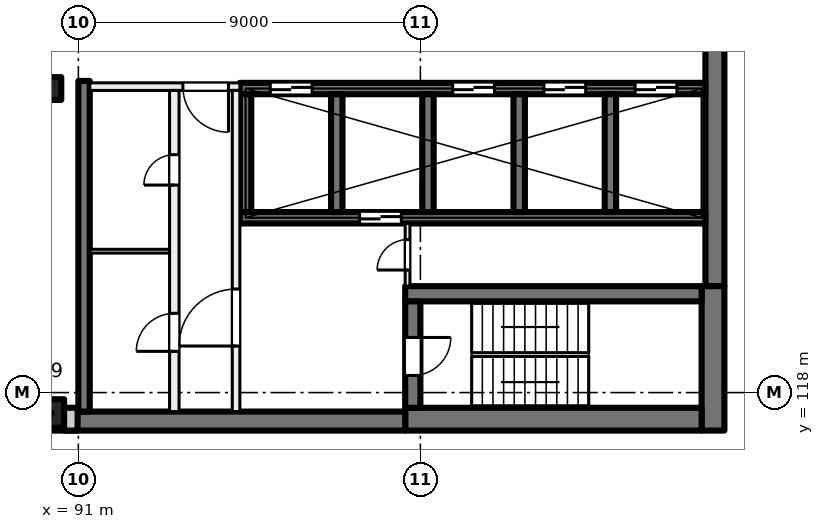
"""IFC4 building model, lengths in metres.
Left out: names, types, materials, properties, quantities, classifications, styles, units other than length and angle.
Written with IfcOpenShell. Run it as: python <this file> out.ifc"""

import sys

from ifc_helpers import new_model, si_unit, direction, frame, frame_2d, origin, origin_2d, place, context, subcontext, project, spatial, rectangle, extrude, element, fill, save


model = new_model("IFC4")
c1 = context("Model", 3, precision=1e-05, world=origin(), true_north=direction((0.0, 1.0)))
c2 = subcontext(c1, "Body", "Model", "MODEL_VIEW")
j1 = project(units=[si_unit("LENGTHUNIT", "METRE"), si_unit("PLANEANGLEUNIT", "RADIAN")], contexts=[c1])
p1 = place(None, origin())
s1 = spatial("IfcSite", under=j1, at=p1, CompositionType="ELEMENT")
p2 = place(p1, origin())
s2 = spatial("IfcBuilding", under=s1, at=p2, CompositionType="ELEMENT")
p3 = place(p2, frame((0.0, 0.0, 216.0)))
s3 = spatial("IfcBuildingStorey", under=s2, at=p3, CompositionType="ELEMENT", Elevation=216.0)
p4 = place(p3, frame((90.25, 126.0, 0.0), z_axis=(0.0, 0.0, 1.0), x_axis=(1.0, 0.0, 0.0)))
e1 = element("IfcColumn", 1, at=p4, inside=s3, PredefinedType="COLUMN", context=c2, shape_type="SweptSolid", body=[
    extrude(rectangle(XDim=0.6, YDim=0.6, at=origin_2d()), origin(), (0.0, 0.0, 1.0), 4.0),
])
p5 = place(p3, frame((90.25, 117.45, 0.0), z_axis=(0.0, 0.0, 1.0), x_axis=(1.0, 0.0, 0.0)))
e2 = element("IfcColumn", 2, at=p5, inside=s3, PredefinedType="COLUMN", context=c2, shape_type="SweptSolid", body=[
    extrude(rectangle(XDim=0.75, YDim=0.75, at=origin_2d()), origin(), (0.0, 0.0, 1.0), 4.0),
])
p6 = place(p3, frame((107.75, 135.2, 0.0), z_axis=(0.0, 0.0, 1.0), x_axis=(0.0, -1.0, 0.0)))
e3 = element("IfcWall", 3, at=p6, inside=s3, PredefinedType="SHEAR", context=c2, shape_type="SweptSolid", body=[
    extrude(rectangle(XDim=14.4, YDim=0.5, at=frame_2d((7.2, 0.0))), origin(), (0.0, 0.0, 1.0), 4.0),
])
p7 = place(p3, frame((107.7, 120.8, 0.0), z_axis=(0.0, 0.0, 1.0), x_axis=(0.0, -1.0, 0.0)))
e4 = element("IfcWall", 4, at=p7, inside=s3, PredefinedType="SHEAR", context=c2, shape_type="SweptSolid", body=[
    extrude(rectangle(XDim=3.8, YDim=0.6, at=frame_2d((1.9, 0.0))), origin(), (0.0, 0.0, 1.0), 4.0),
])
p8 = place(p3, frame((107.4, 117.3, 0.0), z_axis=(0.0, 0.0, 1.0), x_axis=(-1.0, 0.0, 0.0)))
e5 = element("IfcWall", 5, at=p8, inside=s3, PredefinedType="SHEAR", context=c2, shape_type="SweptSolid", body=[
    extrude(rectangle(XDim=7.8, YDim=0.6, at=frame_2d((3.9, 0.0))), origin(), (0.0, 0.0, 1.0), 4.0),
])
p9 = place(p3, frame((99.6, 117.25, 0.0), z_axis=(0.0, 0.0, 1.0), x_axis=(-1.0, 0.0, 0.0)))
e6 = element("IfcWall", 6, at=p9, inside=s3, PredefinedType="SHEAR", context=c2, shape_type="SweptSolid", body=[
    extrude(rectangle(XDim=8.975, YDim=0.5, at=frame_2d((4.488, 0.0))), origin(), (0.0, 0.0, 1.0), 4.0),
])
p10 = place(p3, frame((107.4, 120.6, 0.0), z_axis=(0.0, 0.0, 1.0), x_axis=(-1.0, 0.0, 0.0)))
e7 = element("IfcWall", 7, at=p10, inside=s3, PredefinedType="SHEAR", context=c2, shape_type="SweptSolid", body=[
    extrude(rectangle(XDim=7.8, YDim=0.4, at=frame_2d((3.9, 0.0))), origin(), (0.0, 0.0, 1.0), 4.0),
])
p11 = place(p3, frame((99.8, 120.4, 0.0), z_axis=(0.0, 0.0, 1.0), x_axis=(0.0, -1.0, 0.0)))
e8 = element("IfcWall", 8, at=p11, inside=s3, PredefinedType="SHEAR", context=c2, shape_type="SweptSolid", body=[
    extrude(rectangle(XDim=2.8, YDim=0.4, at=frame_2d((1.4, 0.0))), origin(), (0.0, 0.0, 1.0), 4.0),
])
p12 = place(p11, frame((0.95, 0.0, 0.0)))
e9 = element("IfcOpeningElement", 9, at=p12, cuts=e8, PredefinedType="OPENING", context=c2, shape_type="SweptSolid", body=[
    extrude(rectangle(XDim=1.0, YDim=2.1, at=frame_2d((0.5, 1.05))), frame((0.0, 0.21, 0.0), z_axis=(0.0, -1.0, 0.0), x_axis=(1.0, 0.0, 0.0)), (0.0, 0.0, 1.0), 0.42),
])
p13 = place(p3, frame((107.5, 126.0, 0.0), z_axis=(0.0, 0.0, 1.0), x_axis=(-1.0, 0.0, 0.0)))
e10 = element("IfcWall", 10, at=p13, inside=s3, PredefinedType="SHEAR", context=c2, shape_type="SweptSolid", body=[
    extrude(rectangle(XDim=12.25, YDim=0.3, at=frame_2d((6.125, 0.0))), origin(), (0.0, 0.0, 1.0), 4.0),
])
p14 = place(p13, frame((0.75, 0.0, 0.0)))
e11 = element("IfcOpeningElement", 11, at=p14, cuts=e10, PredefinedType="OPENING", context=c2, shape_type="SweptSolid", body=[
    extrude(rectangle(XDim=1.1, YDim=2.1, at=frame_2d((0.55, 1.05))), frame((0.0, 0.16, 0.0), z_axis=(0.0, -1.0, 0.0), x_axis=(1.0, 0.0, 0.0)), (0.0, 0.0, 1.0), 0.32),
])
p15 = place(p13, frame((3.15, 0.0, 0.0)))
e12 = element("IfcOpeningElement", 12, at=p15, cuts=e10, PredefinedType="OPENING", context=c2, shape_type="SweptSolid", body=[
    extrude(rectangle(XDim=1.1, YDim=2.1, at=frame_2d((0.55, 1.05))), frame((0.0, 0.16, 0.0), z_axis=(0.0, -1.0, 0.0), x_axis=(1.0, 0.0, 0.0)), (0.0, 0.0, 1.0), 0.32),
])
p16 = place(p13, frame((5.55, 0.0, 0.0)))
e13 = element("IfcOpeningElement", 13, at=p16, cuts=e10, PredefinedType="OPENING", context=c2, shape_type="SweptSolid", body=[
    extrude(rectangle(XDim=1.1, YDim=2.1, at=frame_2d((0.55, 1.05))), frame((0.0, 0.16, 0.0), z_axis=(0.0, -1.0, 0.0), x_axis=(1.0, 0.0, 0.0)), (0.0, 0.0, 1.0), 0.32),
])
p17 = place(p13, frame((10.35, 0.0, 0.0)))
e14 = element("IfcOpeningElement", 14, at=p17, cuts=e10, PredefinedType="OPENING", context=c2, shape_type="SweptSolid", body=[
    extrude(rectangle(XDim=1.1, YDim=2.1, at=frame_2d((0.55, 1.05))), frame((0.0, 0.16, 0.0), z_axis=(0.0, -1.0, 0.0), x_axis=(1.0, 0.0, 0.0)), (0.0, 0.0, 1.0), 0.32),
])
p18 = place(p3, frame((107.5, 122.6, 0.0), z_axis=(0.0, 0.0, 1.0), x_axis=(-1.0, 0.0, 0.0)))
e15 = element("IfcWall", 15, at=p18, inside=s3, PredefinedType="SHEAR", context=c2, shape_type="SweptSolid", body=[
    extrude(rectangle(XDim=12.25, YDim=0.3, at=frame_2d((6.125, 0.0))), origin(), (0.0, 0.0, 1.0), 4.0),
])
p19 = place(p18, frame((8.0, 0.0, 0.0)))
e16 = element("IfcOpeningElement", 16, at=p19, cuts=e15, PredefinedType="OPENING", context=c2, shape_type="SweptSolid", body=[
    extrude(rectangle(XDim=1.1, YDim=2.1, at=frame_2d((0.55, 1.05))), frame((0.0, 0.16, 0.0), z_axis=(0.0, -1.0, 0.0), x_axis=(1.0, 0.0, 0.0)), (0.0, 0.0, 1.0), 0.32),
])
for number, where, z_axis, x_axis in (
    (17, (105.0, 125.85, 0.0), (0.0, 0.0, 1.0), (0.0, -1.0, 0.0)),
    (18, (102.6, 125.85, 0.0), (0.0, 0.0, 1.0), (0.0, -1.0, 0.0)),
    (19, (100.2, 125.85, 0.0), (0.0, 0.0, 1.0), (0.0, -1.0, 0.0)),
    (20, (97.8, 125.85, 0.0), (0.0, 0.0, 1.0), (0.0, -1.0, 0.0)),
    (21, (95.4, 125.85, 0.0), (0.0, 0.0, 1.0), (0.0, -1.0, 0.0)),
):
    element("IfcWall", number, at=place(p3, frame(where, z_axis=z_axis, x_axis=x_axis)), inside=s3, PredefinedType="SHEAR", context=c2, shape_type="SweptSolid", body=[
        extrude(rectangle(XDim=3.1, YDim=0.3, at=frame_2d((1.55, 0.0))), origin(), (0.0, 0.0, 1.0), 4.0),
    ])
p20 = place(p3, frame((91.15, 126.2, 0.0), z_axis=(0.0, 0.0, 1.0), x_axis=(0.0, -1.0, 0.0)))
e22 = element("IfcWall", 22, at=p20, inside=s3, PredefinedType="SHEAR", context=c2, shape_type="SweptSolid", body=[
    extrude(rectangle(XDim=8.7, YDim=0.3, at=frame_2d((4.35, 0.0))), origin(), (0.0, 0.0, 1.0), 4.0),
])
p21 = place(p3, frame((90.98, 117.3, 0.0), z_axis=(0.0, 0.0, 1.0), x_axis=(-1.0, 0.0, 0.0)))
e23 = element("IfcWall", 23, at=p21, inside=s3, PredefinedType="SOLIDWALL", context=c2, shape_type="SweptSolid", body=[
    extrude(rectangle(XDim=32.845, YDim=0.6, at=frame_2d((16.422, 0.0))), origin(), (0.0, 0.0, 1.0), 3.625),
])
p22 = place(p21, frame((1.48, 0.0, 0.9)))
e24 = element("IfcOpeningElement", 24, at=p22, cuts=e23, PredefinedType="OPENING", context=c2, shape_type="SweptSolid", body=[
    extrude(rectangle(XDim=3.0, YDim=2.4, at=frame_2d((1.5, 1.2))), frame((0.0, 0.31, 0.0), z_axis=(0.0, -1.0, 0.0), x_axis=(1.0, 0.0, 0.0)), (0.0, 0.0, 1.0), 0.62),
])
p23 = place(p21, frame((5.98, 0.0, 0.9)))
e25 = element("IfcOpeningElement", 25, at=p23, cuts=e23, PredefinedType="OPENING", context=c2, shape_type="SweptSolid", body=[
    extrude(rectangle(XDim=3.0, YDim=2.4, at=frame_2d((1.5, 1.2))), frame((0.0, 0.31, 0.0), z_axis=(0.0, -1.0, 0.0), x_axis=(1.0, 0.0, 0.0)), (0.0, 0.0, 1.0), 0.62),
])
p24 = place(p21, frame((10.48, 0.0, 0.9)))
e26 = element("IfcOpeningElement", 26, at=p24, cuts=e23, PredefinedType="OPENING", context=c2, shape_type="SweptSolid", body=[
    extrude(rectangle(XDim=3.0, YDim=2.4, at=frame_2d((1.5, 1.2))), frame((0.0, 0.31, 0.0), z_axis=(0.0, -1.0, 0.0), x_axis=(1.0, 0.0, 0.0)), (0.0, 0.0, 1.0), 0.62),
])
p25 = place(p21, frame((14.98, 0.0, 0.9)))
e27 = element("IfcOpeningElement", 27, at=p25, cuts=e23, PredefinedType="OPENING", context=c2, shape_type="SweptSolid", body=[
    extrude(rectangle(XDim=3.0, YDim=2.4, at=frame_2d((1.5, 1.2))), frame((0.0, 0.31, 0.0), z_axis=(0.0, -1.0, 0.0), x_axis=(1.0, 0.0, 0.0)), (0.0, 0.0, 1.0), 0.62),
])
p26 = place(p21, frame((19.48, 0.0, 0.9)))
e28 = element("IfcOpeningElement", 28, at=p26, cuts=e23, PredefinedType="OPENING", context=c2, shape_type="SweptSolid", body=[
    extrude(rectangle(XDim=3.0, YDim=2.4, at=frame_2d((1.5, 1.2))), frame((0.0, 0.31, 0.0), z_axis=(0.0, -1.0, 0.0), x_axis=(1.0, 0.0, 0.0)), (0.0, 0.0, 1.0), 0.62),
])
p27 = place(p21, frame((23.98, 0.0, 0.9)))
e29 = element("IfcOpeningElement", 29, at=p27, cuts=e23, PredefinedType="OPENING", context=c2, shape_type="SweptSolid", body=[
    extrude(rectangle(XDim=3.0, YDim=2.4, at=frame_2d((1.5, 1.2))), frame((0.0, 0.31, 0.0), z_axis=(0.0, -1.0, 0.0), x_axis=(1.0, 0.0, 0.0)), (0.0, 0.0, 1.0), 0.62),
])
p28 = place(p21, frame((28.48, 0.0, 0.9)))
e30 = element("IfcOpeningElement", 30, at=p28, cuts=e23, PredefinedType="OPENING", context=c2, shape_type="SweptSolid", body=[
    extrude(rectangle(XDim=3.0, YDim=2.4, at=frame_2d((1.5, 1.2))), frame((0.0, 0.31, 0.0), z_axis=(0.0, -1.0, 0.0), x_axis=(1.0, 0.0, 0.0)), (0.0, 0.0, 1.0), 0.62),
])
p29 = place(p3, frame((95.25, 126.05, 0.0), z_axis=(0.0, 0.0, 1.0), x_axis=(-1.0, 0.0, 0.0)))
e31 = element("IfcWall", 31, at=p29, inside=s3, PredefinedType="PARTITIONING", context=c2, shape_type="SweptSolid", body=[
    extrude(rectangle(XDim=3.95, YDim=0.2, at=frame_2d((1.975, 0.0))), origin(), (0.0, 0.0, 1.0), 3.625),
])
p30 = place(p29, frame((0.3, 0.0, 0.0)))
e32 = element("IfcOpeningElement", 32, at=p30, cuts=e31, PredefinedType="OPENING", context=c2, shape_type="SweptSolid", body=[
    extrude(rectangle(XDim=1.2, YDim=2.1, at=frame_2d((0.6, 1.05))), frame((0.0, 0.11, 0.0), z_axis=(0.0, -1.0, 0.0), x_axis=(1.0, 0.0, 0.0)), (0.0, 0.0, 1.0), 0.22),
])
p31 = place(p3, frame((95.15, 117.5, 0.0), z_axis=(0.0, 0.0, 1.0), x_axis=(0.0, 1.0, 0.0)))
e33 = element("IfcWall", 33, at=p31, inside=s3, PredefinedType="PARTITIONING", context=c2, shape_type="SweptSolid", body=[
    extrude(rectangle(XDim=8.45, YDim=0.2, at=frame_2d((4.225, 0.0))), origin(), (0.0, 0.0, 1.0), 3.625),
])
p32 = place(p31, frame((1.725, 0.0, 0.0)))
e34 = element("IfcOpeningElement", 34, at=p32, cuts=e33, PredefinedType="OPENING", context=c2, shape_type="SweptSolid", body=[
    extrude(rectangle(XDim=1.5, YDim=2.1, at=frame_2d((0.75, 1.05))), frame((0.0, 0.11, 0.0), z_axis=(0.0, -1.0, 0.0), x_axis=(1.0, 0.0, 0.0)), (0.0, 0.0, 1.0), 0.22),
])
p33 = place(p3, frame((93.525, 117.5, 0.0), z_axis=(0.0, 0.0, 1.0), x_axis=(0.0, 1.0, 0.0)))
e35 = element("IfcWall", 35, at=p33, inside=s3, PredefinedType="PARTITIONING", context=c2, shape_type="SweptSolid", body=[
    extrude(rectangle(XDim=8.45, YDim=0.25, at=frame_2d((4.225, 0.0))), origin(), (0.0, 0.0, 1.0), 3.625),
])
p34 = place(p33, frame((5.96, 0.0, 0.0)))
e36 = element("IfcOpeningElement", 36, at=p34, cuts=e35, PredefinedType="OPENING", context=c2, shape_type="SweptSolid", body=[
    extrude(rectangle(XDim=0.8, YDim=2.1, at=frame_2d((0.4, 1.05))), frame((0.0, 0.135, 0.0), z_axis=(0.0, -1.0, 0.0), x_axis=(1.0, 0.0, 0.0)), (0.0, 0.0, 1.0), 0.27),
])
p35 = place(p33, frame((1.585, 0.0, 0.0)))
e37 = element("IfcOpeningElement", 37, at=p35, cuts=e35, PredefinedType="OPENING", context=c2, shape_type="SweptSolid", body=[
    extrude(rectangle(XDim=1.0, YDim=2.1, at=frame_2d((0.5, 1.05))), frame((0.0, 0.135, 0.0), z_axis=(0.0, -1.0, 0.0), x_axis=(1.0, 0.0, 0.0)), (0.0, 0.0, 1.0), 0.27),
])
p36 = place(p3, frame((99.663, 120.8, 0.0), z_axis=(0.0, 0.0, 1.0), x_axis=(0.0, 1.0, 0.0)))
e38 = element("IfcWall", 38, at=p36, inside=s3, PredefinedType="PARTITIONING", context=c2, shape_type="SweptSolid", body=[
    extrude(rectangle(XDim=1.65, YDim=0.125, at=frame_2d((0.825, 0.0))), origin(), (0.0, 0.0, 1.0), 3.625),
])
p37 = place(p36, frame((0.425, 0.0, 0.0)))
e39 = element("IfcOpeningElement", 39, at=p37, cuts=e38, PredefinedType="OPENING", context=c2, shape_type="SweptSolid", body=[
    extrude(rectangle(XDim=0.8, YDim=2.1, at=frame_2d((0.4, 1.05))), frame((0.0, 0.073, 0.0), z_axis=(0.0, -1.0, 0.0), x_axis=(1.0, 0.0, 0.0)), (0.0, 0.0, 1.0), 0.145),
])
p38 = place(p3, frame((93.4, 121.72, 0.0), z_axis=(0.0, 0.0, 1.0), x_axis=(-1.0, 0.0, 0.0)))
e40 = element("IfcWall", 40, at=p38, inside=s3, PredefinedType="PARTITIONING", context=c2, shape_type="SweptSolid", body=[
    extrude(rectangle(XDim=2.1, YDim=0.1, at=frame_2d((1.05, 0.0))), origin(), (0.0, 0.0, 1.0), 3.625),
])
p39 = place(p14, origin())
e41 = element("IfcDoor", 41, at=p39, inside=s3, OperationType="DOUBLE_DOOR_SLIDING", PredefinedType="DOOR", context=c2, shape_type="SweptSolid", body=[
    extrude(rectangle(XDim=1.1, YDim=2.1, at=frame_2d((0.55, 1.05))), frame((0.0, 0.025, 0.0), z_axis=(0.0, -1.0, 0.0), x_axis=(1.0, 0.0, 0.0)), (0.0, 0.0, 1.0), 0.05),
])
fill(e11, e41)
p40 = place(p15, origin())
e42 = element("IfcDoor", 42, at=p40, inside=s3, OperationType="DOUBLE_DOOR_SLIDING", PredefinedType="DOOR", context=c2, shape_type="SweptSolid", body=[
    extrude(rectangle(XDim=1.1, YDim=2.1, at=frame_2d((0.55, 1.05))), frame((0.0, 0.025, 0.0), z_axis=(0.0, -1.0, 0.0), x_axis=(1.0, 0.0, 0.0)), (0.0, 0.0, 1.0), 0.05),
])
fill(e12, e42)
p41 = place(p16, origin())
e43 = element("IfcDoor", 43, at=p41, inside=s3, OperationType="DOUBLE_DOOR_SLIDING", PredefinedType="DOOR", context=c2, shape_type="SweptSolid", body=[
    extrude(rectangle(XDim=1.1, YDim=2.1, at=frame_2d((0.55, 1.05))), frame((0.0, 0.025, 0.0), z_axis=(0.0, -1.0, 0.0), x_axis=(1.0, 0.0, 0.0)), (0.0, 0.0, 1.0), 0.05),
])
fill(e13, e43)
p42 = place(p17, origin())
e44 = element("IfcDoor", 44, at=p42, inside=s3, OperationType="DOUBLE_DOOR_SLIDING", PredefinedType="DOOR", context=c2, shape_type="SweptSolid", body=[
    extrude(rectangle(XDim=1.1, YDim=2.1, at=frame_2d((0.55, 1.05))), frame((0.0, 0.025, 0.0), z_axis=(0.0, -1.0, 0.0), x_axis=(1.0, 0.0, 0.0)), (0.0, 0.0, 1.0), 0.05),
])
fill(e14, e44)
p43 = place(p30, origin())
e45 = element("IfcDoor", 45, at=p43, inside=s3, OperationType="DOUBLE_DOOR_SINGLE_SWING", PredefinedType="DOOR", context=c2, shape_type="SweptSolid", body=[
    extrude(rectangle(XDim=1.2, YDim=2.1, at=frame_2d((0.6, 1.05))), frame((0.0, 0.025, 0.0), z_axis=(0.0, -1.0, 0.0), x_axis=(1.0, 0.0, 0.0)), (0.0, 0.0, 1.0), 0.05),
])
fill(e32, e45)
p44 = place(p32, origin())
e46 = element("IfcDoor", 46, at=p44, inside=s3, OperationType="DOUBLE_DOOR_SINGLE_SWING", PredefinedType="DOOR", context=c2, shape_type="SweptSolid", body=[
    extrude(rectangle(XDim=1.5, YDim=2.1, at=frame_2d((0.75, 1.05))), frame((0.0, 0.025, 0.0), z_axis=(0.0, -1.0, 0.0), x_axis=(1.0, 0.0, 0.0)), (0.0, 0.0, 1.0), 0.05),
])
fill(e34, e46)
p45 = place(p12, origin())
e47 = element("IfcDoor", 47, at=p45, inside=s3, OperationType="SINGLE_SWING_LEFT", PredefinedType="DOOR", context=c2, shape_type="SweptSolid", body=[
    extrude(rectangle(XDim=1.0, YDim=2.1, at=frame_2d((0.5, 1.05))), frame((0.0, 0.025, 0.0), z_axis=(0.0, -1.0, 0.0), x_axis=(1.0, 0.0, 0.0)), (0.0, 0.0, 1.0), 0.05),
])
fill(e9, e47)
p46 = place(p37, origin())
e48 = element("IfcDoor", 48, at=p46, inside=s3, OperationType="SINGLE_SWING_RIGHT", PredefinedType="DOOR", context=c2, shape_type="SweptSolid", body=[
    extrude(rectangle(XDim=0.8, YDim=2.1, at=frame_2d((0.4, 1.05))), frame((0.0, 0.025, 0.0), z_axis=(0.0, -1.0, 0.0), x_axis=(1.0, 0.0, 0.0)), (0.0, 0.0, 1.0), 0.05),
])
fill(e39, e48)
p47 = place(p34, origin())
e49 = element("IfcDoor", 49, at=p47, inside=s3, OperationType="SINGLE_SWING_LEFT", PredefinedType="DOOR", context=c2, shape_type="SweptSolid", body=[
    extrude(rectangle(XDim=0.8, YDim=2.1, at=frame_2d((0.4, 1.05))), frame((0.0, 0.025, 0.0), z_axis=(0.0, -1.0, 0.0), x_axis=(1.0, 0.0, 0.0)), (0.0, 0.0, 1.0), 0.05),
])
fill(e36, e49)
p48 = place(p35, origin())
e50 = element("IfcDoor", 50, at=p48, inside=s3, OperationType="SINGLE_SWING_RIGHT", PredefinedType="DOOR", context=c2, shape_type="SweptSolid", body=[
    extrude(rectangle(XDim=1.0, YDim=2.1, at=frame_2d((0.5, 1.05))), frame((0.0, 0.025, 0.0), z_axis=(0.0, -1.0, 0.0), x_axis=(1.0, 0.0, 0.0)), (0.0, 0.0, 1.0), 0.05),
])
fill(e37, e50)
p49 = place(p19, origin())
e51 = element("IfcDoor", 51, at=p49, inside=s3, OperationType="DOUBLE_DOOR_SLIDING", PredefinedType="DOOR", context=c2, shape_type="SweptSolid", body=[
    extrude(rectangle(XDim=1.1, YDim=2.1, at=frame_2d((0.55, 1.05))), frame((0.0, 0.025, 0.0), z_axis=(0.0, -1.0, 0.0), x_axis=(1.0, 0.0, 0.0)), (0.0, 0.0, 1.0), 0.05),
])
fill(e16, e51)
save(model, sys.argv[1])
